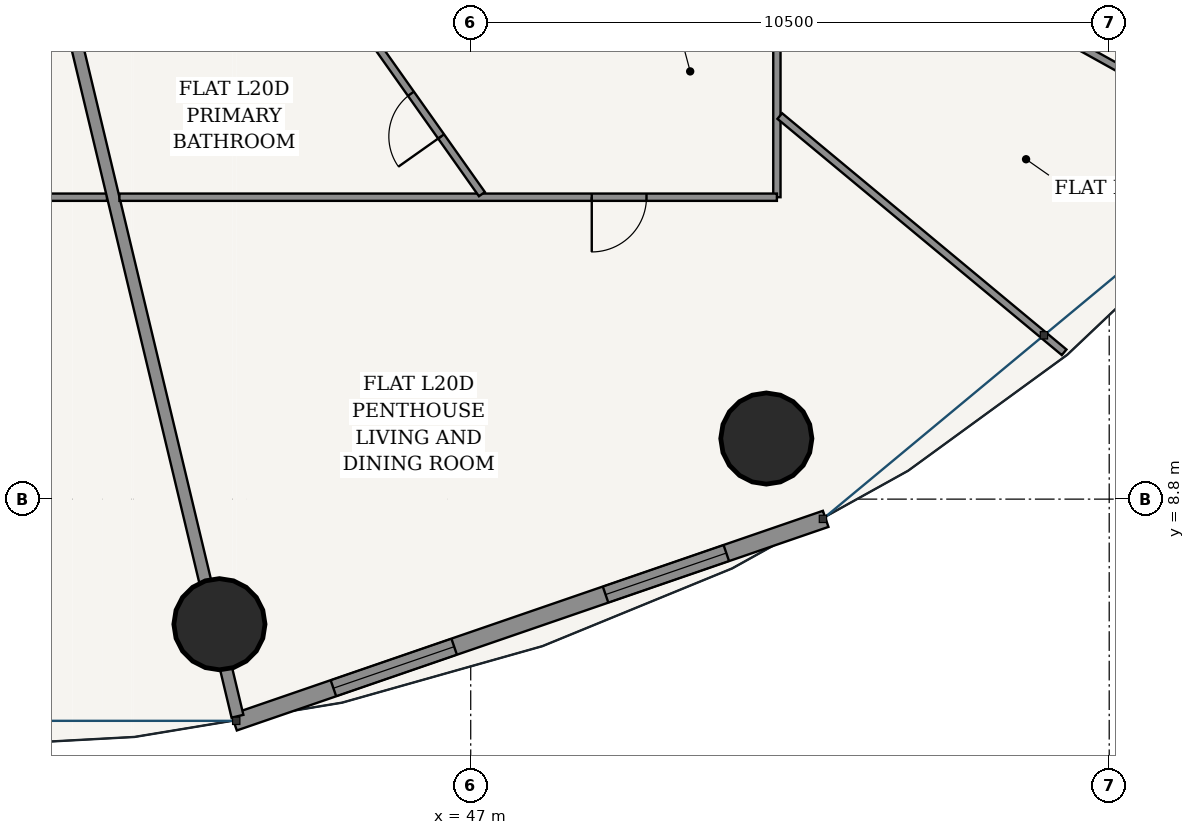
"""IFC4 building model, lengths in metres.
Left out: names, types, materials, properties, quantities, classifications, styles, units other than length and angle.
Written with IfcOpenShell. Run it as: python <this file> out.ifc"""

import sys

from ifc_helpers import new_model, si_unit, direction, frame, frame_2d, origin, origin_2d, place, context, subcontext, project, spatial, rectangle, hollow_circle, extrude, source, transform, mapped, element, fill, save


model = new_model("IFC4")
c1 = context("Model", 3, precision=1e-05, world=origin(), true_north=direction((-0.2419218956, 0.970295726276)))
c2 = subcontext(c1, "Body", "Model", "MODEL_VIEW")
j1 = project(units=[si_unit("LENGTHUNIT", "METRE"), si_unit("PLANEANGLEUNIT", "RADIAN")], contexts=[c1])
p1 = place(None, origin())
s1 = spatial("IfcSite", under=j1, at=p1, CompositionType="ELEMENT")
p2 = place(p1, origin())
s2 = spatial("IfcBuilding", under=s1, at=p2, CompositionType="ELEMENT")
p3 = place(p2, frame((0.0, 0.0, 79.8)))
s3 = spatial("IfcBuildingStorey", under=s2, at=p3, CompositionType="ELEMENT", Elevation=79.8)
for number, where, z_axis, x_axis in (
    (1, (42.867, 6.743, 0.0), (0.0, 0.0, 1.0), (1.0, 0.0, 0.0)),
    (2, (51.862, 9.796, 0.0), (0.0, 0.0, 1.0), (1.0, 0.0, 0.0)),
):
    element("IfcColumn", number, at=place(p3, frame(where, z_axis=z_axis, x_axis=x_axis)), inside=s3, PredefinedType="COLUMN", context=c2, shape_type="SweptSolid", body=[
        extrude(hollow_circle(Radius=0.75, WallThickness=0.045, at=origin_2d()), origin(), (0.0, 0.0, 1.0), 3.6),
    ])
p4 = place(p3, frame((43.108, 5.128, 0.0), z_axis=(0.0, 0.0, 1.0), x_axis=(0.945590132341, 0.325360264351, 0.0)))
e3 = element("IfcWall", 3, at=p4, inside=s3, PredefinedType="SOLIDWALL", context=c2, shape_type="SweptSolid", body=[
    extrude(rectangle(XDim=10.289, YDim=0.28, at=frame_2d((5.145, 0.0))), origin(), (0.0, 0.0, 1.0), 3.325),
])
p5 = place(p4, frame((1.728, 0.0, 0.85)))
e4 = element("IfcOpeningElement", 4, at=p5, cuts=e3, PredefinedType="OPENING", context=c2, shape_type="SweptSolid", body=[
    extrude(rectangle(XDim=2.1, YDim=1.95, at=frame_2d((1.05, 0.975))), frame((0.0, 0.15, 0.0), z_axis=(0.0, -1.0, 0.0), x_axis=(1.0, 0.0, 0.0)), (0.0, 0.0, 1.0), 0.3),
])
p6 = place(p4, frame((6.461, 0.0, 0.85)))
e5 = element("IfcOpeningElement", 5, at=p6, cuts=e3, PredefinedType="OPENING", context=c2, shape_type="SweptSolid", body=[
    extrude(rectangle(XDim=2.1, YDim=1.95, at=frame_2d((1.05, 0.975))), frame((0.0, 0.15, 0.0), z_axis=(0.0, -1.0, 0.0), x_axis=(1.0, 0.0, 0.0)), (0.0, 0.0, 1.0), 0.3),
])
p7 = place(p3, frame((41.019, 13.765, 0.0), z_axis=(0.0, 0.0, 1.0), x_axis=(-1.0, 0.0, 0.0)))
e6 = element("IfcWall", 6, at=p7, inside=s3, PredefinedType="PARTITIONING", context=c2, shape_type="SweptSolid", body=[
    extrude(rectangle(XDim=17.054, YDim=0.12, at=frame_2d((8.527, 0.0))), origin(), (0.0, 0.0, 1.0), 2.767),
])
p8 = place(p7, frame((10.933, 0.0, 0.0)))
e7 = element("IfcOpeningElement", 7, at=p8, cuts=e6, PredefinedType="OPENING", context=c2, shape_type="SweptSolid", body=[
    extrude(rectangle(XDim=0.9, YDim=2.15, at=frame_2d((0.45, 1.075))), frame((0.0, 0.07, 0.0), z_axis=(0.0, -1.0, 0.0), x_axis=(1.0, 0.0, 0.0)), (0.0, 0.0, 1.0), 0.14),
])
p9 = place(p3, frame((40.486, 16.415, 0.0), z_axis=(0.0, 0.0, 1.0), x_axis=(0.232829417917, -0.972517589636, 0.0)))
e8 = element("IfcWall", 8, at=p9, inside=s3, PredefinedType="PARTITIONING", context=c2, shape_type="SweptSolid", body=[
    extrude(rectangle(XDim=11.502, YDim=0.2, at=frame_2d((5.751, 0.0))), origin(), (0.0, 0.0, 1.0), 2.767),
])
p10 = place(p3, frame((52.035, 29.017, 0.0), z_axis=(0.0, 0.0, 1.0), x_axis=(0.0, -1.0, 0.0)))
e9 = element("IfcWall", 9, at=p10, inside=s3, PredefinedType="PARTITIONING", context=c2, shape_type="SweptSolid", body=[
    extrude(rectangle(XDim=15.252, YDim=0.12, at=frame_2d((7.626, 0.0))), origin(), (0.0, 0.0, 1.0), 2.767),
])
p11 = place(p10, frame((7.278, 0.0, 0.0)))
e10 = element("IfcOpeningElement", 10, at=p11, cuts=e9, PredefinedType="OPENING", context=c2, shape_type="SweptSolid", body=[
    extrude(rectangle(XDim=0.9, YDim=2.15, at=frame_2d((0.45, 1.075))), frame((0.0, 0.07, 0.0), z_axis=(0.0, -1.0, 0.0), x_axis=(1.0, 0.0, 0.0)), (0.0, 0.0, 1.0), 0.14),
])
p12 = place(p3, frame((52.035, 13.765, 0.0), z_axis=(0.0, 0.0, 1.0), x_axis=(-1.0, 0.0, 0.0)))
e11 = element("IfcWall", 11, at=p12, inside=s3, PredefinedType="PARTITIONING", context=c2, shape_type="SweptSolid", body=[
    extrude(rectangle(XDim=10.812, YDim=0.12, at=frame_2d((5.406, 0.0))), origin(), (0.0, 0.0, 1.0), 2.767),
])
p13 = place(p12, frame((2.145, 0.0, 0.0)))
e12 = element("IfcOpeningElement", 12, at=p13, cuts=e11, PredefinedType="OPENING", context=c2, shape_type="SweptSolid", body=[
    extrude(rectangle(XDim=0.9, YDim=2.15, at=frame_2d((0.45, 1.075))), frame((0.0, 0.07, 0.0), z_axis=(0.0, -1.0, 0.0), x_axis=(1.0, 0.0, 0.0)), (0.0, 0.0, 1.0), 0.14),
])
p14 = place(p3, frame((52.083, 15.1, 0.0), z_axis=(0.0, 0.0, 1.0), x_axis=(0.769161827891, -0.63905405289, 0.0)))
e13 = element("IfcWall", 13, at=p14, inside=s3, PredefinedType="PARTITIONING", context=c2, shape_type="SweptSolid", body=[
    extrude(rectangle(XDim=6.08, YDim=0.12, at=frame_2d((3.04, 0.0))), origin(), (0.0, 0.0, 1.0), 2.767),
])
p15 = place(p3, frame((52.089, 18.979, 0.0), z_axis=(0.0, 0.0, 1.0), x_axis=(0.874313476423, -0.485361664066, 0.0)))
e14 = element("IfcWall", 14, at=p15, inside=s3, PredefinedType="PARTITIONING", context=c2, shape_type="SweptSolid", body=[
    extrude(rectangle(XDim=9.066, YDim=0.12, at=frame_2d((4.533, 0.0))), origin(), (0.0, 0.0, 1.0), 2.767),
])
p16 = place(p15, frame((3.02, 0.0, 0.0)))
e15 = element("IfcOpeningElement", 15, at=p16, cuts=e14, PredefinedType="OPENING", context=c2, shape_type="SweptSolid", body=[
    extrude(rectangle(XDim=0.9, YDim=2.15, at=frame_2d((0.45, 1.075))), frame((0.0, 0.07, 0.0), z_axis=(0.0, -1.0, 0.0), x_axis=(1.0, 0.0, 0.0)), (0.0, 0.0, 1.0), 0.14),
])
p17 = place(p3, frame((45.345, 16.415, 0.0), z_axis=(0.0, 0.0, 1.0), x_axis=(0.577474693199, -0.816408585645, 0.0)))
e16 = element("IfcWall", 16, at=p17, inside=s3, PredefinedType="PARTITIONING", context=c2, shape_type="SweptSolid", body=[
    extrude(rectangle(XDim=3.184, YDim=0.12, at=frame_2d((1.592, 0.0))), origin(), (0.0, 0.0, 1.0), 3.004),
])
p18 = place(p17, frame((1.162, 0.0, 0.0)))
e17 = element("IfcOpeningElement", 17, at=p18, cuts=e16, PredefinedType="OPENING", context=c2, shape_type="SweptSolid", body=[
    extrude(rectangle(XDim=0.86, YDim=2.15, at=frame_2d((0.43, 1.075))), frame((0.0, 0.07, 0.0), z_axis=(0.0, -1.0, 0.0), x_axis=(1.0, 0.0, 0.0)), (0.0, 0.0, 1.0), 0.14),
])
m1 = source(origin(), c2, "Body", "SweptSolid", [
    extrude(rectangle(XDim=2.1, YDim=1.95, at=frame_2d((1.05, 0.975))), frame((0.0, 0.03, 0.0), z_axis=(0.0, -1.0, 0.0), x_axis=(1.0, 0.0, 0.0)), (0.0, 0.0, 1.0), 0.06),
])
p19 = place(p5, origin())
e18 = element("IfcWindow", 18, at=p19, inside=s3, PartitioningType="SINGLE_PANEL", PredefinedType="WINDOW", context=c2, shape_type="MappedRepresentation", body=[
    mapped(m1, transform((0.0, 0.0, 0.0), scale=1.0)),
])
fill(e4, e18)
p20 = place(p6, origin())
e19 = element("IfcWindow", 19, at=p20, inside=s3, PartitioningType="SINGLE_PANEL", PredefinedType="WINDOW", context=c2, shape_type="MappedRepresentation", body=[
    mapped(m1, transform((0.0, 0.0, 0.0), scale=1.0)),
])
fill(e5, e19)
m2 = source(origin(), c2, "Body", "SweptSolid", [
    extrude(rectangle(XDim=0.86, YDim=2.15, at=frame_2d((0.43, 1.075))), frame((0.0, 0.025, 0.0), z_axis=(0.0, -1.0, 0.0), x_axis=(1.0, 0.0, 0.0)), (0.0, 0.0, 1.0), 0.05),
])
p21 = place(p18, frame((0.86, 0.0, 0.0), z_axis=(0.0, 0.0, 1.0), x_axis=(-1.0, 0.0, 0.0)))
e20 = element("IfcDoor", 20, at=p21, inside=s3, OperationType="SINGLE_SWING_LEFT", PredefinedType="DOOR", context=c2, shape_type="MappedRepresentation", body=[
    mapped(m2, transform((0.0, 0.0, 0.0), scale=1.0)),
])
fill(e17, e20)
m3 = source(origin(), c2, "Body", "SweptSolid", [
    extrude(rectangle(XDim=0.9, YDim=2.15, at=frame_2d((0.45, 1.075))), frame((0.0, 0.025, 0.0), z_axis=(0.0, -1.0, 0.0), x_axis=(1.0, 0.0, 0.0)), (0.0, 0.0, 1.0), 0.05),
])
p22 = place(p13, origin())
e21 = element("IfcDoor", 21, at=p22, inside=s3, OperationType="SINGLE_SWING_RIGHT", PredefinedType="DOOR", context=c2, shape_type="MappedRepresentation", body=[
    mapped(m3, transform((0.0, 0.0, 0.0), scale=1.0)),
])
fill(e12, e21)
save(model, sys.argv[1])
